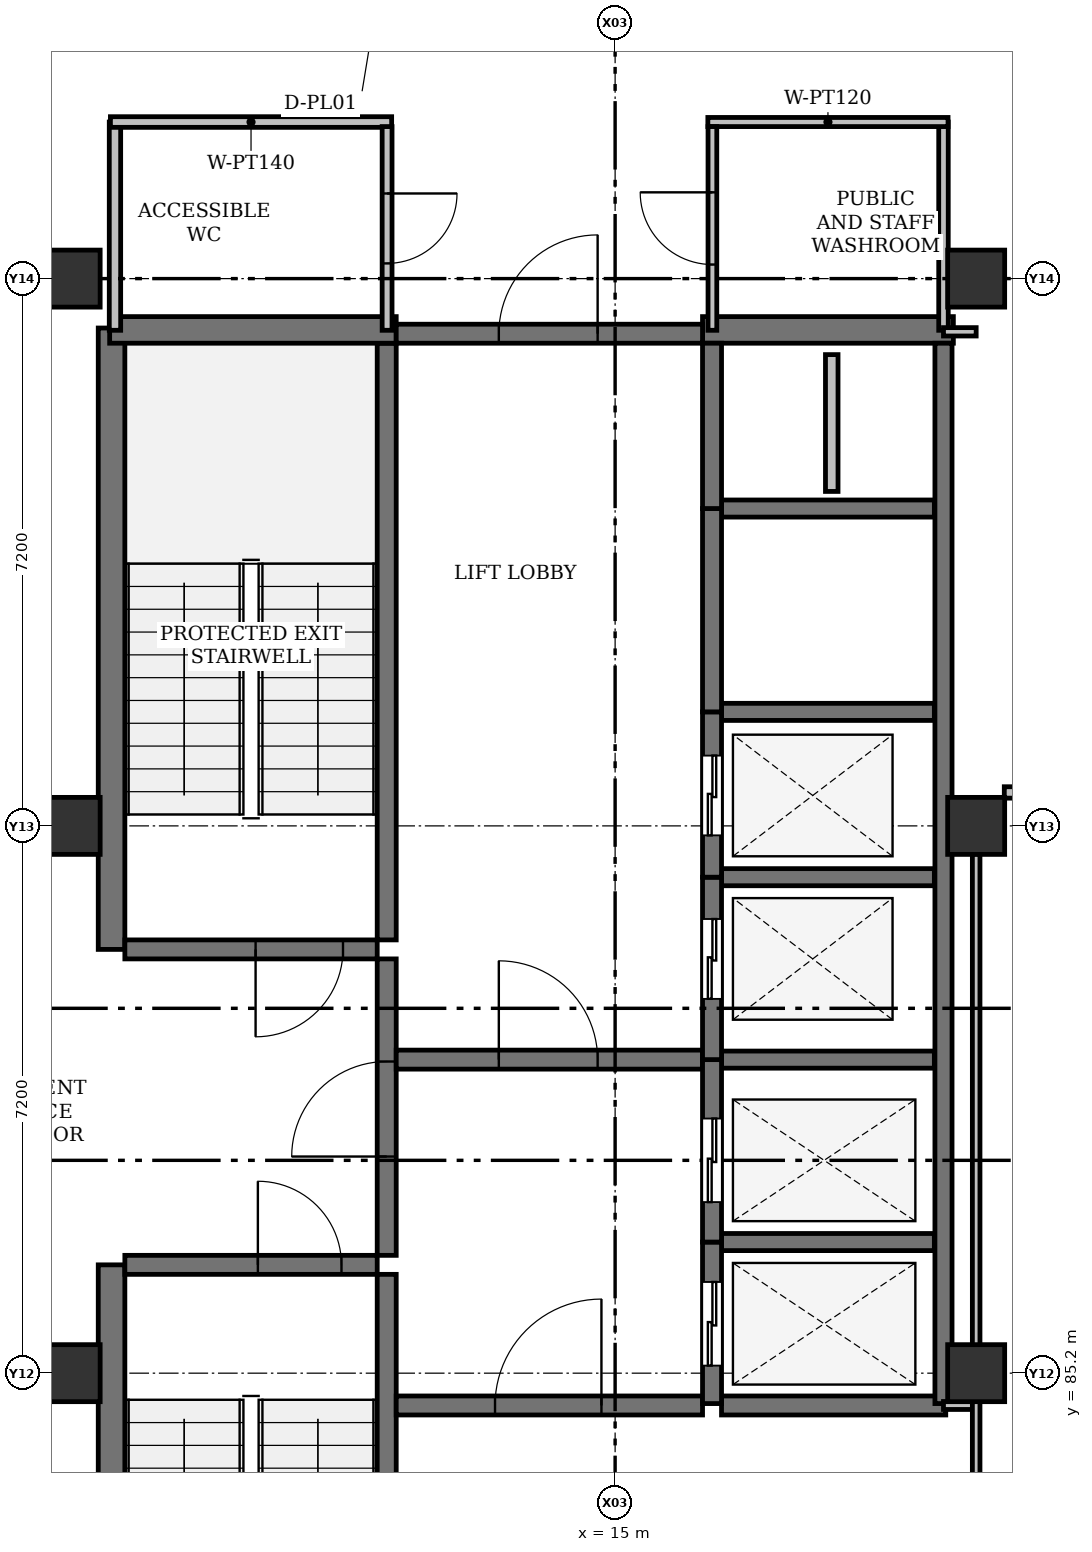
"""IFC4 building model, lengths in metres.
Left out: names, types, materials, properties, quantities, classifications, styles, units other than length and angle.
Written with IfcOpenShell. Run it as: python <this file> out.ifc"""

import sys

from ifc_helpers import new_model, si_unit, direction, frame, frame_2d, origin, origin_2d, place, context, subcontext, project, spatial, rectangle, extrude, element, fill, save


model = new_model("IFC4")
c1 = context("Model", 3, precision=1e-05, world=origin(), true_north=direction((0.0, 1.0)))
c2 = subcontext(c1, "Body", "Model", "MODEL_VIEW")
j1 = project(units=[si_unit("LENGTHUNIT", "METRE"), si_unit("PLANEANGLEUNIT", "RADIAN")], contexts=[c1])
p1 = place(None, origin())
s1 = spatial("IfcSite", under=j1, at=p1, CompositionType="ELEMENT")
p2 = place(p1, origin())
s2 = spatial("IfcBuilding", under=s1, at=p2, CompositionType="ELEMENT")
p3 = place(p2, frame((0.0, 0.0, -8.4)))
s3 = spatial("IfcBuildingStorey", under=s2, at=p3, CompositionType="ELEMENT", Elevation=-8.4)
for number, where, z_axis, x_axis in (
    (1, (7.85, 85.2, -0.3), (0.0, 0.0, 1.0), (1.0, 0.0, 0.0)),
    (2, (19.75, 85.2, -0.3), (0.0, 0.0, 1.0), (1.0, 0.0, 0.0)),
    (3, (7.85, 92.4, -0.3), (0.0, 0.0, 1.0), (1.0, 0.0, 0.0)),
    (4, (19.75, 92.4, -0.3), (0.0, 0.0, 1.0), (1.0, 0.0, 0.0)),
    (5, (7.85, 99.6, -0.3), (0.0, 0.0, 1.0), (1.0, 0.0, 0.0)),
    (6, (19.75, 99.6, -0.3), (0.0, 0.0, 1.0), (1.0, 0.0, 0.0)),
):
    element("IfcColumn", number, at=place(p3, frame(where, z_axis=z_axis, x_axis=x_axis)), inside=s3, PredefinedType="COLUMN", context=c2, shape_type="SweptSolid", body=[
        extrude(rectangle(XDim=0.75, YDim=0.75, at=origin_2d()), origin(), (0.0, 0.0, 1.0), 4.5),
    ])
for number, where, z_axis, x_axis in (
    (7, (8.375, 78.45, -0.3), (0.0, 0.0, 1.0), (0.0, 1.0, 0.0)),
    (8, (8.375, 90.775, -0.3), (0.0, 0.0, 1.0), (0.0, 1.0, 0.0)),
):
    element("IfcWall", number, at=place(p3, frame(where, z_axis=z_axis, x_axis=x_axis)), inside=s3, PredefinedType="SHEAR", context=c2, shape_type="SweptSolid", body=[
        extrude(rectangle(XDim=8.175, YDim=0.35, at=frame_2d((4.087, 0.0))), origin(), (0.0, 0.0, 1.0), 4.5),
    ])
for number, where, z_axis, x_axis in (
    (9, (11.995, 78.65, -0.3), (0.0, 0.0, 1.0), (0.0, 1.0, 0.0)),
    (10, (11.995, 90.9, -0.3), (0.0, 0.0, 1.0), (0.0, 1.0, 0.0)),
):
    element("IfcWall", number, at=place(p3, frame(where, z_axis=z_axis, x_axis=x_axis)), inside=s3, PredefinedType="SHEAR", context=c2, shape_type="SweptSolid", body=[
        extrude(rectangle(XDim=7.85, YDim=0.25, at=frame_2d((3.925, 0.0))), origin(), (0.0, 0.0, 1.0), 4.5),
    ])
p4 = place(p3, frame((11.995, 86.75, -0.3), z_axis=(0.0, 0.0, 1.0), x_axis=(0.0, 1.0, 0.0)))
e11 = element("IfcWall", 11, at=p4, inside=s3, PredefinedType="SHEAR", context=c2, shape_type="SweptSolid", body=[
    extrude(rectangle(XDim=3.9, YDim=0.25, at=frame_2d((1.95, 0.0))), origin(), (0.0, 0.0, 1.0), 4.5),
])
p5 = place(p4, frame((1.3, 0.0, 0.3)))
e12 = element("IfcOpeningElement", 12, at=p5, cuts=e11, PredefinedType="OPENING", context=c2, shape_type="SweptSolid", body=[
    extrude(rectangle(XDim=1.25, YDim=2.2, at=frame_2d((0.625, 1.1))), frame((0.0, 0.125, 0.0), z_axis=(0.0, -1.0, 0.0), x_axis=(1.0, 0.0, 0.0)), (0.0, 0.0, 1.0), 0.25),
])
p6 = place(p3, frame((8.35, 98.925, -0.3), z_axis=(0.0, 0.0, 1.0), x_axis=(1.0, 0.0, 0.0)))
e13 = element("IfcWall", 13, at=p6, inside=s3, PredefinedType="SHEAR", context=c2, shape_type="SweptSolid", body=[
    extrude(rectangle(XDim=3.77, YDim=0.35, at=frame_2d((1.885, 0.0))), origin(), (0.0, 0.0, 1.0), 4.5),
])
p7 = place(p3, frame((16.15, 98.925, -0.3), z_axis=(0.0, 0.0, 1.0), x_axis=(1.0, 0.0, 0.0)))
e14 = element("IfcWall", 14, at=p7, inside=s3, PredefinedType="SHEAR", context=c2, shape_type="SweptSolid", body=[
    extrude(rectangle(XDim=3.3, YDim=0.35, at=frame_2d((1.65, 0.0))), origin(), (0.0, 0.0, 1.0), 4.5),
])
p8 = place(p3, frame((12.12, 98.875, -0.3), z_axis=(0.0, 0.0, 1.0), x_axis=(1.0, 0.0, 0.0)))
e15 = element("IfcWall", 15, at=p8, inside=s3, PredefinedType="SHEAR", context=c2, shape_type="SweptSolid", body=[
    extrude(rectangle(XDim=4.03, YDim=0.25, at=frame_2d((2.015, 0.0))), origin(), (0.0, 0.0, 1.0), 4.5),
])
p9 = place(p8, frame((1.35, 0.0, 0.3)))
e16 = element("IfcOpeningElement", 16, at=p9, cuts=e15, PredefinedType="OPENING", context=c2, shape_type="SweptSolid", body=[
    extrude(rectangle(XDim=1.3, YDim=2.2, at=frame_2d((0.65, 1.1))), frame((0.0, 0.125, 0.0), z_axis=(0.0, -1.0, 0.0), x_axis=(1.0, 0.0, 0.0)), (0.0, 0.0, 1.0), 0.25),
])
p10 = place(p3, frame((8.55, 86.625, -0.3), z_axis=(0.0, 0.0, 1.0), x_axis=(1.0, 0.0, 0.0)))
e17 = element("IfcWall", 17, at=p10, inside=s3, PredefinedType="SHEAR", context=c2, shape_type="SweptSolid", body=[
    extrude(rectangle(XDim=3.32, YDim=0.25, at=frame_2d((1.66, 0.0))), origin(), (0.0, 0.0, 1.0), 4.5),
])
p11 = place(p10, frame((1.75, 0.0, 0.3)))
e18 = element("IfcOpeningElement", 18, at=p11, cuts=e17, PredefinedType="OPENING", context=c2, shape_type="SweptSolid", body=[
    extrude(rectangle(XDim=1.1, YDim=2.15, at=frame_2d((0.55, 1.075))), frame((0.0, 0.125, 0.0), z_axis=(0.0, -1.0, 0.0), x_axis=(1.0, 0.0, 0.0)), (0.0, 0.0, 1.0), 0.25),
])
p12 = place(p3, frame((11.87, 90.775, -0.3), z_axis=(0.0, 0.0, 1.0), x_axis=(-1.0, 0.0, 0.0)))
e19 = element("IfcWall", 19, at=p12, inside=s3, PredefinedType="SHEAR", context=c2, shape_type="SweptSolid", body=[
    extrude(rectangle(XDim=3.32, YDim=0.25, at=frame_2d((1.66, 0.0))), origin(), (0.0, 0.0, 1.0), 4.5),
])
p13 = place(p12, frame((0.45, 0.0, 0.3)))
e20 = element("IfcOpeningElement", 20, at=p13, cuts=e19, PredefinedType="OPENING", context=c2, shape_type="SweptSolid", body=[
    extrude(rectangle(XDim=1.15, YDim=2.15, at=frame_2d((0.575, 1.075))), frame((0.0, 0.125, 0.0), z_axis=(0.0, -1.0, 0.0), x_axis=(1.0, 0.0, 0.0)), (0.0, 0.0, 1.0), 0.25),
])
p14 = place(p3, frame((12.12, 89.325, -0.3), z_axis=(0.0, 0.0, 1.0), x_axis=(1.0, 0.0, 0.0)))
e21 = element("IfcWall", 21, at=p14, inside=s3, PredefinedType="SHEAR", context=c2, shape_type="SweptSolid", body=[
    extrude(rectangle(XDim=4.03, YDim=0.25, at=frame_2d((2.015, 0.0))), origin(), (0.0, 0.0, 1.0), 4.5),
])
p15 = place(p14, frame((1.35, 0.0, 0.3)))
e22 = element("IfcOpeningElement", 22, at=p15, cuts=e21, PredefinedType="OPENING", context=c2, shape_type="SweptSolid", body=[
    extrude(rectangle(XDim=1.3, YDim=2.2, at=frame_2d((0.65, 1.1))), frame((0.0, 0.125, 0.0), z_axis=(0.0, -1.0, 0.0), x_axis=(1.0, 0.0, 0.0)), (0.0, 0.0, 1.0), 0.25),
])
p16 = place(p3, frame((12.12, 84.775, -0.3), z_axis=(0.0, 0.0, 1.0), x_axis=(1.0, 0.0, 0.0)))
e23 = element("IfcWall", 23, at=p16, inside=s3, PredefinedType="SHEAR", context=c2, shape_type="SweptSolid", body=[
    extrude(rectangle(XDim=4.03, YDim=0.25, at=frame_2d((2.015, 0.0))), origin(), (0.0, 0.0, 1.0), 4.5),
])
p17 = place(p16, frame((1.3, 0.0, 0.3)))
e24 = element("IfcOpeningElement", 24, at=p17, cuts=e23, PredefinedType="OPENING", context=c2, shape_type="SweptSolid", body=[
    extrude(rectangle(XDim=1.4, YDim=2.25, at=frame_2d((0.7, 1.125))), frame((0.0, 0.125, 0.0), z_axis=(0.0, -1.0, 0.0), x_axis=(1.0, 0.0, 0.0)), (0.0, 0.0, 1.0), 0.25),
])
p18 = place(p3, frame((16.4, 84.775, -0.3), z_axis=(0.0, 0.0, 1.0), x_axis=(1.0, 0.0, 0.0)))
e25 = element("IfcWall", 25, at=p18, inside=s3, PredefinedType="SHEAR", context=c2, shape_type="SweptSolid", body=[
    extrude(rectangle(XDim=2.95, YDim=0.25, at=frame_2d((1.475, 0.0))), origin(), (0.0, 0.0, 1.0), 4.5),
])
p19 = place(p3, frame((19.32, 84.8, -0.3), z_axis=(0.0, 0.0, 1.0), x_axis=(0.0, 1.0, 0.0)))
e26 = element("IfcWall", 26, at=p19, inside=s3, PredefinedType="SHEAR", context=c2, shape_type="SweptSolid", body=[
    extrude(rectangle(XDim=13.95, YDim=0.225, at=frame_2d((6.975, 0.0))), origin(), (0.0, 0.0, 1.0), 4.5),
])
for number, where, z_axis, x_axis in (
    (27, (16.4, 86.925, -0.3), (0.0, 0.0, 1.0), (1.0, 0.0, 0.0)),
    (28, (16.4, 89.325, -0.3), (0.0, 0.0, 1.0), (1.0, 0.0, 0.0)),
    (29, (16.4, 91.725, -0.3), (0.0, 0.0, 1.0), (1.0, 0.0, 0.0)),
    (30, (16.4, 93.9, -0.3), (0.0, 0.0, 1.0), (1.0, 0.0, 0.0)),
    (31, (16.4, 96.575, -0.3), (0.0, 0.0, 1.0), (1.0, 0.0, 0.0)),
):
    element("IfcWall", number, at=place(p3, frame(where, z_axis=z_axis, x_axis=x_axis)), inside=s3, PredefinedType="SHEAR", context=c2, shape_type="SweptSolid", body=[
        extrude(rectangle(XDim=2.8, YDim=0.225, at=frame_2d((1.4, 0.0))), origin(), (0.0, 0.0, 1.0), 4.5),
    ])
p20 = place(p3, frame((16.275, 84.8, -0.3), z_axis=(0.0, 0.0, 1.0), x_axis=(0.0, 1.0, 0.0)))
e32 = element("IfcWall", 32, at=p20, inside=s3, PredefinedType="SHEAR", context=c2, shape_type="SweptSolid", body=[
    extrude(rectangle(XDim=2.125, YDim=0.25, at=frame_2d((1.062, 0.0))), origin(), (0.0, 0.0, 1.0), 4.5),
])
p21 = place(p20, frame((0.5, 0.0, 0.3)))
e33 = element("IfcOpeningElement", 33, at=p21, cuts=e32, PredefinedType="OPENING", context=c2, shape_type="SweptSolid", body=[
    extrude(rectangle(XDim=1.1, YDim=2.15, at=frame_2d((0.55, 1.075))), frame((0.0, 0.125, 0.0), z_axis=(0.0, -1.0, 0.0), x_axis=(1.0, 0.0, 0.0)), (0.0, 0.0, 1.0), 0.25),
])
p22 = place(p3, frame((16.275, 86.925, -0.3), z_axis=(0.0, 0.0, 1.0), x_axis=(0.0, 1.0, 0.0)))
e34 = element("IfcWall", 34, at=p22, inside=s3, PredefinedType="SHEAR", context=c2, shape_type="SweptSolid", body=[
    extrude(rectangle(XDim=2.4, YDim=0.25, at=frame_2d((1.2, 0.0))), origin(), (0.0, 0.0, 1.0), 4.5),
])
p23 = place(p22, frame((0.525, 0.0, 0.3)))
e35 = element("IfcOpeningElement", 35, at=p23, cuts=e34, PredefinedType="OPENING", context=c2, shape_type="SweptSolid", body=[
    extrude(rectangle(XDim=1.1, YDim=2.15, at=frame_2d((0.55, 1.075))), frame((0.0, 0.125, 0.0), z_axis=(0.0, -1.0, 0.0), x_axis=(1.0, 0.0, 0.0)), (0.0, 0.0, 1.0), 0.25),
])
p24 = place(p3, frame((16.275, 89.325, -0.3), z_axis=(0.0, 0.0, 1.0), x_axis=(0.0, 1.0, 0.0)))
e36 = element("IfcWall", 36, at=p24, inside=s3, PredefinedType="SHEAR", context=c2, shape_type="SweptSolid", body=[
    extrude(rectangle(XDim=2.4, YDim=0.25, at=frame_2d((1.2, 0.0))), origin(), (0.0, 0.0, 1.0), 4.5),
])
p25 = place(p24, frame((0.8, 0.0, 0.3)))
e37 = element("IfcOpeningElement", 37, at=p25, cuts=e36, PredefinedType="OPENING", context=c2, shape_type="SweptSolid", body=[
    extrude(rectangle(XDim=1.05, YDim=2.15, at=frame_2d((0.525, 1.075))), frame((0.0, 0.125, 0.0), z_axis=(0.0, -1.0, 0.0), x_axis=(1.0, 0.0, 0.0)), (0.0, 0.0, 1.0), 0.25),
])
p26 = place(p3, frame((16.275, 91.725, -0.3), z_axis=(0.0, 0.0, 1.0), x_axis=(0.0, 1.0, 0.0)))
e38 = element("IfcWall", 38, at=p26, inside=s3, PredefinedType="SHEAR", context=c2, shape_type="SweptSolid", body=[
    extrude(rectangle(XDim=2.175, YDim=0.25, at=frame_2d((1.087, 0.0))), origin(), (0.0, 0.0, 1.0), 4.5),
])
p27 = place(p26, frame((0.55, 0.0, 0.3)))
e39 = element("IfcOpeningElement", 39, at=p27, cuts=e38, PredefinedType="OPENING", context=c2, shape_type="SweptSolid", body=[
    extrude(rectangle(XDim=1.05, YDim=2.15, at=frame_2d((0.525, 1.075))), frame((0.0, 0.125, 0.0), z_axis=(0.0, -1.0, 0.0), x_axis=(1.0, 0.0, 0.0)), (0.0, 0.0, 1.0), 0.25),
])
p28 = place(p3, frame((16.275, 93.9, -0.3), z_axis=(0.0, 0.0, 1.0), x_axis=(0.0, 1.0, 0.0)))
e40 = element("IfcWall", 40, at=p28, inside=s3, PredefinedType="SHEAR", context=c2, shape_type="SweptSolid", body=[
    extrude(rectangle(XDim=2.675, YDim=0.25, at=frame_2d((1.337, 0.0))), origin(), (0.0, 0.0, 1.0), 4.5),
])
p29 = place(p3, frame((16.275, 96.575, -0.3), z_axis=(0.0, 0.0, 1.0), x_axis=(0.0, 1.0, 0.0)))
e41 = element("IfcWall", 41, at=p29, inside=s3, PredefinedType="SHEAR", context=c2, shape_type="SweptSolid", body=[
    extrude(rectangle(XDim=2.175, YDim=0.25, at=frame_2d((1.087, 0.0))), origin(), (0.0, 0.0, 1.0), 4.5),
])
p30 = place(p3, frame((17.85, 96.8, -0.3), z_axis=(0.0, 0.0, 1.0), x_axis=(0.0, 1.0, 0.0)))
e42 = element("IfcWall", 42, at=p30, inside=s3, PredefinedType="PLUMBINGWALL", context=c2, shape_type="SweptSolid", body=[
    extrude(rectangle(XDim=1.8, YDim=0.165, at=frame_2d((0.9, 0.0))), origin(), (0.0, 0.0, 1.0), 4.5),
])
p31 = place(p3, frame((8.42, 98.92, 0.0), z_axis=(0.0, 0.0, 1.0), x_axis=(0.0, 1.0, 0.0)))
e43 = element("IfcWall", 43, at=p31, inside=s3, PredefinedType="PARTITIONING", context=c2, shape_type="SweptSolid", body=[
    extrude(rectangle(XDim=2.74, YDim=0.15, at=frame_2d((1.37, 0.0))), origin(), (0.0, 0.0, 1.0), 3.411),
])
p32 = place(p3, frame((8.36, 101.66, 0.0), z_axis=(0.0, 0.0, 1.0), x_axis=(1.0, 0.0, 0.0)))
e44 = element("IfcWall", 44, at=p32, inside=s3, PredefinedType="PARTITIONING", context=c2, shape_type="SweptSolid", body=[
    extrude(rectangle(XDim=3.7, YDim=0.14, at=frame_2d((1.85, 0.0))), origin(), (0.0, 0.0, 1.0), 3.95),
])
p33 = place(p3, frame((12.0, 101.6, 0.0), z_axis=(0.0, 0.0, 1.0), x_axis=(0.0, -1.0, 0.0)))
e45 = element("IfcWall", 45, at=p33, inside=s3, PredefinedType="PARTITIONING", context=c2, shape_type="SweptSolid", body=[
    extrude(rectangle(XDim=2.68, YDim=0.13, at=frame_2d((1.34, 0.0))), origin(), (0.0, 0.0, 1.0), 3.411),
])
p34 = place(p33, frame((0.88, 0.0, 0.0)))
e46 = element("IfcOpeningElement", 46, at=p34, cuts=e45, PredefinedType="OPENING", context=c2, shape_type="SweptSolid", body=[
    extrude(rectangle(XDim=0.92, YDim=2.1, at=frame_2d((0.46, 1.05))), frame((0.0, 0.065, 0.0), z_axis=(0.0, -1.0, 0.0), x_axis=(1.0, 0.0, 0.0)), (0.0, 0.0, 1.0), 0.13),
])
p35 = place(p3, frame((19.32, 98.92, 0.0), z_axis=(0.0, 0.0, 1.0), x_axis=(0.0, 1.0, 0.0)))
e47 = element("IfcWall", 47, at=p35, inside=s3, PredefinedType="PARTITIONING", context=c2, shape_type="SweptSolid", body=[
    extrude(rectangle(XDim=2.74, YDim=0.125, at=frame_2d((1.37, 0.0))), origin(), (0.0, 0.0, 1.0), 3.411),
])
p36 = place(p3, frame((19.38, 101.66, 0.0), z_axis=(0.0, 0.0, 1.0), x_axis=(-1.0, 0.0, 0.0)))
e48 = element("IfcWall", 48, at=p36, inside=s3, PredefinedType="PARTITIONING", context=c2, shape_type="SweptSolid", body=[
    extrude(rectangle(XDim=3.16, YDim=0.12, at=frame_2d((1.58, 0.0))), origin(), (0.0, 0.0, 1.0), 3.95),
])
p37 = place(p3, frame((16.28, 98.92, 0.0), z_axis=(0.0, 0.0, 1.0), x_axis=(0.0, 1.0, 0.0)))
e49 = element("IfcWall", 49, at=p37, inside=s3, PredefinedType="PARTITIONING", context=c2, shape_type="SweptSolid", body=[
    extrude(rectangle(XDim=2.68, YDim=0.115, at=frame_2d((1.34, 0.0))), origin(), (0.0, 0.0, 1.0), 3.411),
])
p38 = place(p37, frame((0.865, 0.0, 0.0)))
e50 = element("IfcOpeningElement", 50, at=p38, cuts=e49, PredefinedType="OPENING", context=c2, shape_type="SweptSolid", body=[
    extrude(rectangle(XDim=0.95, YDim=2.1, at=frame_2d((0.475, 1.05))), frame((0.0, 0.058, 0.0), z_axis=(0.0, -1.0, 0.0), x_axis=(1.0, 0.0, 0.0)), (0.0, 0.0, 1.0), 0.115),
])
p39 = place(p3, frame((19.75, 98.9, 0.0), z_axis=(0.0, 0.0, 1.0), x_axis=(-1.0, 0.0, 0.0)))
e51 = element("IfcWall", 51, at=p39, inside=s3, PredefinedType="PARTITIONING", context=c2, shape_type="SweptSolid", body=[
    extrude(rectangle(XDim=0.43, YDim=0.11, at=frame_2d((0.215, 0.0))), origin(), (0.0, 0.0, 1.0), 3.487),
])
p40 = place(p3, frame((19.32, 84.775, 0.0), z_axis=(0.0, 0.0, 1.0), x_axis=(1.0, 0.0, 0.0)))
e52 = element("IfcWall", 52, at=p40, inside=s3, PredefinedType="PARTITIONING", context=c2, shape_type="SweptSolid", body=[
    extrude(rectangle(XDim=0.43, YDim=0.105, at=frame_2d((0.215, 0.0))), origin(), (0.0, 0.0, 1.0), 3.487),
])
p41 = place(p3, frame((19.75, 92.03, 0.0), z_axis=(0.0, 0.0, 1.0), x_axis=(0.0, -1.0, 0.0)))
e53 = element("IfcWall", 53, at=p41, inside=s3, PredefinedType="PARTITIONING", context=c2, shape_type="SweptSolid", body=[
    extrude(rectangle(XDim=16.23, YDim=0.1, at=frame_2d((8.115, 0.0))), origin(), (0.0, 0.0, 1.0), 3.487),
])
p42 = place(p3, frame((20.12, 92.84, 0.0), z_axis=(0.0, 0.0, 1.0), x_axis=(1.0, 0.0, 0.0)))
e54 = element("IfcWall", 54, at=p42, inside=s3, PredefinedType="PARTITIONING", context=c2, shape_type="SweptSolid", body=[
    extrude(rectangle(XDim=12.28, YDim=0.15, at=frame_2d((6.14, 0.0))), origin(), (0.0, 0.0, 1.0), 3.537),
])
p43 = place(p5, origin())
e55 = element("IfcDoor", 55, at=p43, inside=s3, OperationType="SINGLE_SWING_LEFT", PredefinedType="DOOR", context=c2, shape_type="SweptSolid", body=[
    extrude(rectangle(XDim=1.25, YDim=2.2, at=frame_2d((0.625, 1.1))), frame((0.0, 0.025, 0.0), z_axis=(0.0, -1.0, 0.0), x_axis=(1.0, 0.0, 0.0)), (0.0, 0.0, 1.0), 0.05),
])
fill(e12, e55)
p44 = place(p9, origin())
e56 = element("IfcDoor", 56, at=p44, inside=s3, OperationType="SINGLE_SWING_RIGHT", PredefinedType="DOOR", context=c2, shape_type="SweptSolid", body=[
    extrude(rectangle(XDim=1.3, YDim=2.2, at=frame_2d((0.65, 1.1))), frame((0.0, 0.025, 0.0), z_axis=(0.0, -1.0, 0.0), x_axis=(1.0, 0.0, 0.0)), (0.0, 0.0, 1.0), 0.05),
])
fill(e16, e56)
p45 = place(p11, origin())
e57 = element("IfcDoor", 57, at=p45, inside=s3, OperationType="SINGLE_SWING_LEFT", PredefinedType="DOOR", context=c2, shape_type="SweptSolid", body=[
    extrude(rectangle(XDim=1.1, YDim=2.15, at=frame_2d((0.55, 1.075))), frame((0.0, 0.025, 0.0), z_axis=(0.0, -1.0, 0.0), x_axis=(1.0, 0.0, 0.0)), (0.0, 0.0, 1.0), 0.05),
])
fill(e18, e57)
p46 = place(p13, origin())
e58 = element("IfcDoor", 58, at=p46, inside=s3, OperationType="SINGLE_SWING_RIGHT", PredefinedType="DOOR", context=c2, shape_type="SweptSolid", body=[
    extrude(rectangle(XDim=1.15, YDim=2.15, at=frame_2d((0.575, 1.075))), frame((0.0, 0.025, 0.0), z_axis=(0.0, -1.0, 0.0), x_axis=(1.0, 0.0, 0.0)), (0.0, 0.0, 1.0), 0.05),
])
fill(e20, e58)
p47 = place(p15, origin())
e59 = element("IfcDoor", 59, at=p47, inside=s3, OperationType="SINGLE_SWING_LEFT", PredefinedType="DOOR", context=c2, shape_type="SweptSolid", body=[
    extrude(rectangle(XDim=1.3, YDim=2.2, at=frame_2d((0.65, 1.1))), frame((0.0, 0.025, 0.0), z_axis=(0.0, -1.0, 0.0), x_axis=(1.0, 0.0, 0.0)), (0.0, 0.0, 1.0), 0.05),
])
fill(e22, e59)
p48 = place(p17, origin())
e60 = element("IfcDoor", 60, at=p48, inside=s3, OperationType="SINGLE_SWING_RIGHT", PredefinedType="DOOR", context=c2, shape_type="SweptSolid", body=[
    extrude(rectangle(XDim=1.4, YDim=2.25, at=frame_2d((0.7, 1.125))), frame((0.0, 0.025, 0.0), z_axis=(0.0, -1.0, 0.0), x_axis=(1.0, 0.0, 0.0)), (0.0, 0.0, 1.0), 0.05),
])
fill(e24, e60)
p49 = place(p21, origin())
e61 = element("IfcDoor", 61, at=p49, inside=s3, OperationType="SLIDING_TO_LEFT", PredefinedType="DOOR", context=c2, shape_type="SweptSolid", body=[
    extrude(rectangle(XDim=1.1, YDim=2.15, at=frame_2d((0.55, 1.075))), frame((0.0, 0.025, 0.0), z_axis=(0.0, -1.0, 0.0), x_axis=(1.0, 0.0, 0.0)), (0.0, 0.0, 1.0), 0.05),
])
fill(e33, e61)
p50 = place(p23, origin())
e62 = element("IfcDoor", 62, at=p50, inside=s3, OperationType="SLIDING_TO_LEFT", PredefinedType="DOOR", context=c2, shape_type="SweptSolid", body=[
    extrude(rectangle(XDim=1.1, YDim=2.15, at=frame_2d((0.55, 1.075))), frame((0.0, 0.025, 0.0), z_axis=(0.0, -1.0, 0.0), x_axis=(1.0, 0.0, 0.0)), (0.0, 0.0, 1.0), 0.05),
])
fill(e35, e62)
p51 = place(p25, origin())
e63 = element("IfcDoor", 63, at=p51, inside=s3, OperationType="SLIDING_TO_LEFT", PredefinedType="DOOR", context=c2, shape_type="SweptSolid", body=[
    extrude(rectangle(XDim=1.05, YDim=2.15, at=frame_2d((0.525, 1.075))), frame((0.0, 0.025, 0.0), z_axis=(0.0, -1.0, 0.0), x_axis=(1.0, 0.0, 0.0)), (0.0, 0.0, 1.0), 0.05),
])
fill(e37, e63)
p52 = place(p27, origin())
e64 = element("IfcDoor", 64, at=p52, inside=s3, OperationType="SLIDING_TO_LEFT", PredefinedType="DOOR", context=c2, shape_type="SweptSolid", body=[
    extrude(rectangle(XDim=1.05, YDim=2.15, at=frame_2d((0.525, 1.075))), frame((0.0, 0.025, 0.0), z_axis=(0.0, -1.0, 0.0), x_axis=(1.0, 0.0, 0.0)), (0.0, 0.0, 1.0), 0.05),
])
fill(e39, e64)
p53 = place(p34, origin())
e65 = element("IfcDoor", 65, at=p53, inside=s3, OperationType="SINGLE_SWING_LEFT", PredefinedType="DOOR", context=c2, shape_type="SweptSolid", body=[
    extrude(rectangle(XDim=0.92, YDim=2.1, at=frame_2d((0.46, 1.05))), frame((0.0, 0.025, 0.0), z_axis=(0.0, -1.0, 0.0), x_axis=(1.0, 0.0, 0.0)), (0.0, 0.0, 1.0), 0.05),
])
fill(e46, e65)
p54 = place(p38, origin())
e66 = element("IfcDoor", 66, at=p54, inside=s3, OperationType="SINGLE_SWING_RIGHT", PredefinedType="DOOR", context=c2, shape_type="SweptSolid", body=[
    extrude(rectangle(XDim=0.95, YDim=2.1, at=frame_2d((0.475, 1.05))), frame((0.0, 0.025, 0.0), z_axis=(0.0, -1.0, 0.0), x_axis=(1.0, 0.0, 0.0)), (0.0, 0.0, 1.0), 0.05),
])
fill(e50, e66)
save(model, sys.argv[1])
